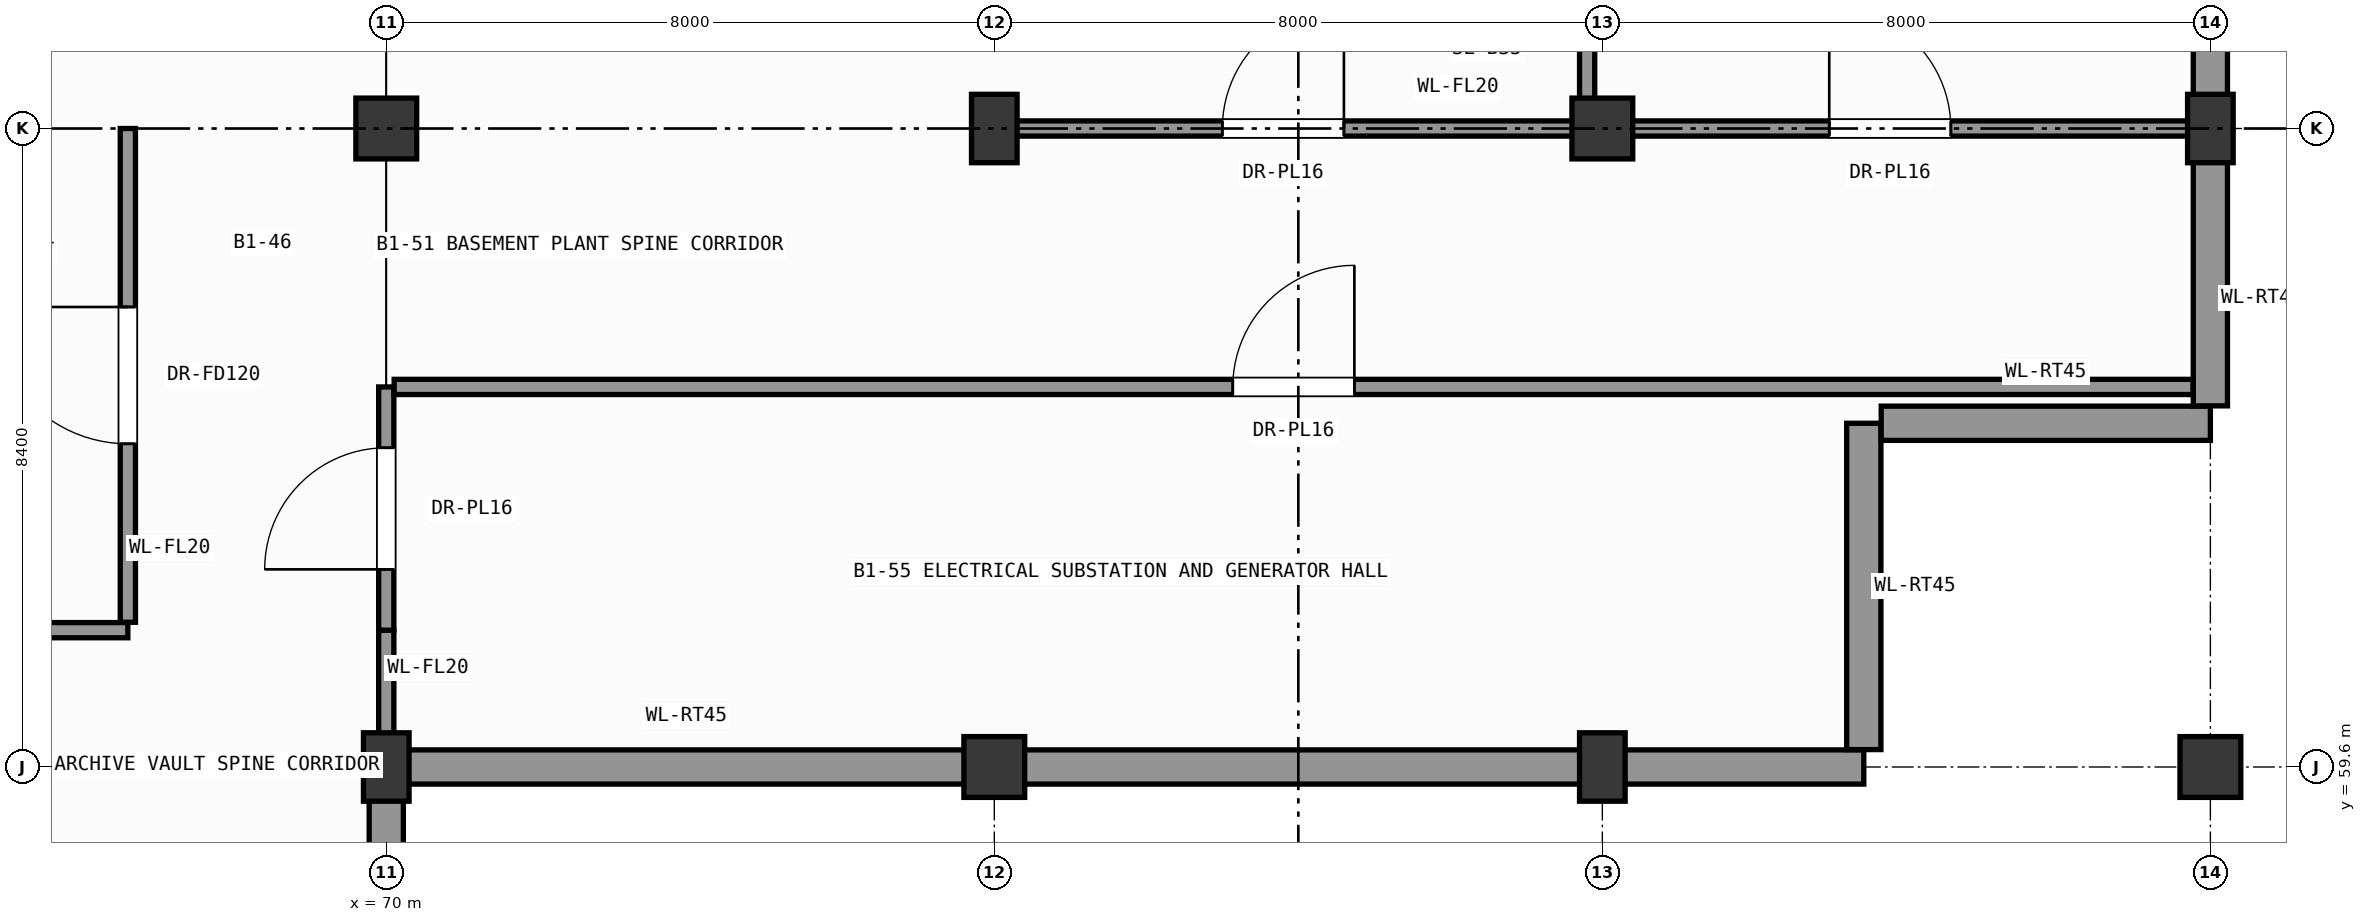
"""IFC4 building model, lengths in metres.
Left out: names, types, materials, properties, quantities, classifications, styles, units other than length and angle.
Written with IfcOpenShell. Run it as: python <this file> out.ifc"""

import sys

from ifc_helpers import new_model, si_unit, direction, frame, frame_2d, origin, origin_2d, place, context, subcontext, project, spatial, rectangle, extrude, element, fill, save


model = new_model("IFC4")
c1 = context("Model", 3, precision=1e-05, world=origin(), true_north=direction((0.0, 1.0)))
c2 = subcontext(c1, "Body", "Model", "MODEL_VIEW")
j1 = project(units=[si_unit("LENGTHUNIT", "METRE"), si_unit("PLANEANGLEUNIT", "RADIAN")], contexts=[c1])
p1 = place(None, origin())
s1 = spatial("IfcSite", under=j1, at=p1, CompositionType="ELEMENT")
p2 = place(p1, origin())
s2 = spatial("IfcBuilding", under=s1, at=p2, CompositionType="ELEMENT")
p3 = place(p2, frame((0.0, 0.0, -4.8)))
s3 = spatial("IfcBuildingStorey", under=s2, at=p3, CompositionType="ELEMENT", Elevation=-4.8)
p4 = place(p3, frame((70.0, 59.6, 0.0), z_axis=(0.0, 0.0, 1.0), x_axis=(1.0, 0.0, 0.0)))
e1 = element("IfcColumn", 1, at=p4, inside=s3, PredefinedType="COLUMN", context=c2, shape_type="SweptSolid", body=[
    extrude(rectangle(XDim=0.6, YDim=0.9, at=origin_2d()), origin(), (0.0, 0.0, 1.0), 4.8),
])
for number, where, z_axis, x_axis in (
    (2, (70.0, 68.0, 0.0), (0.0, 0.0, 1.0), (1.0, 0.0, 0.0)),
    (3, (78.0, 59.6, 0.0), (0.0, 0.0, 1.0), (1.0, 0.0, 0.0)),
):
    element("IfcColumn", number, at=place(p3, frame(where, z_axis=z_axis, x_axis=x_axis)), inside=s3, PredefinedType="COLUMN", context=c2, shape_type="SweptSolid", body=[
        extrude(rectangle(XDim=0.8, YDim=0.8, at=origin_2d()), origin(), (0.0, 0.0, 1.0), 4.8),
    ])
for number, where, z_axis, x_axis in (
    (4, (78.0, 68.0, 0.0), (0.0, 0.0, 1.0), (1.0, 0.0, 0.0)),
    (5, (86.0, 59.6, 0.0), (0.0, 0.0, 1.0), (1.0, 0.0, 0.0)),
):
    element("IfcColumn", number, at=place(p3, frame(where, z_axis=z_axis, x_axis=x_axis)), inside=s3, PredefinedType="COLUMN", context=c2, shape_type="SweptSolid", body=[
        extrude(rectangle(XDim=0.6, YDim=0.9, at=origin_2d()), origin(), (0.0, 0.0, 1.0), 4.8),
    ])
for number, where, z_axis, x_axis in (
    (6, (86.0, 68.0, 0.0), (0.0, 0.0, 1.0), (1.0, 0.0, 0.0)),
    (7, (94.0, 59.6, 0.0), (0.0, 0.0, 1.0), (1.0, 0.0, 0.0)),
):
    element("IfcColumn", number, at=place(p3, frame(where, z_axis=z_axis, x_axis=x_axis)), inside=s3, PredefinedType="COLUMN", context=c2, shape_type="SweptSolid", body=[
        extrude(rectangle(XDim=0.8, YDim=0.8, at=origin_2d()), origin(), (0.0, 0.0, 1.0), 4.8),
    ])
p5 = place(p3, frame((94.0, 68.0, 0.0), z_axis=(0.0, 0.0, 1.0), x_axis=(1.0, 0.0, 0.0)))
e8 = element("IfcColumn", 8, at=p5, inside=s3, PredefinedType="COLUMN", context=c2, shape_type="SweptSolid", body=[
    extrude(rectangle(XDim=0.6, YDim=0.9, at=origin_2d()), origin(), (0.0, 0.0, 1.0), 4.8),
])
p6 = place(p3, frame((70.0, 59.6, 0.0), z_axis=(0.0, 0.0, 1.0), x_axis=(0.0, -1.0, 0.0)))
e9 = element("IfcWall", 9, at=p6, inside=s3, PredefinedType="USERDEFINED", context=c2, shape_type="SweptSolid", body=[
    extrude(rectangle(XDim=6.771, YDim=0.45, at=frame_2d((3.385, 0.0))), origin(), (0.0, 0.0, 1.0), 4.5),
])
p7 = place(p3, frame((78.0, 59.6, 0.0), z_axis=(0.0, 0.0, 1.0), x_axis=(-1.0, 0.0, 0.0)))
e10 = element("IfcWall", 10, at=p7, inside=s3, PredefinedType="USERDEFINED", context=c2, shape_type="SweptSolid", body=[
    extrude(rectangle(XDim=7.771, YDim=0.45, at=frame_2d((3.885, 0.0))), origin(), (0.0, 0.0, 1.0), 4.5),
])
p8 = place(p3, frame((86.0, 59.6, 0.0), z_axis=(0.0, 0.0, 1.0), x_axis=(-1.0, 0.0, 0.0)))
e11 = element("IfcWall", 11, at=p8, inside=s3, PredefinedType="USERDEFINED", context=c2, shape_type="SweptSolid", body=[
    extrude(rectangle(XDim=8.0, YDim=0.45, at=frame_2d((4.0, 0.0))), origin(), (0.0, 0.0, 1.0), 4.5),
])
p9 = place(p3, frame((89.44, 59.6, 0.0), z_axis=(0.0, 0.0, 1.0), x_axis=(-1.0, 0.0, 0.0)))
e12 = element("IfcWall", 12, at=p9, inside=s3, PredefinedType="USERDEFINED", context=c2, shape_type="SweptSolid", body=[
    extrude(rectangle(XDim=3.44, YDim=0.45, at=frame_2d((1.72, 0.0))), origin(), (0.0, 0.0, 1.0), 4.5),
])
p10 = place(p3, frame((89.44, 64.122, 0.0), z_axis=(0.0, 0.0, 1.0), x_axis=(0.0, -1.0, 0.0)))
e13 = element("IfcWall", 13, at=p10, inside=s3, PredefinedType="USERDEFINED", context=c2, shape_type="SweptSolid", body=[
    extrude(rectangle(XDim=4.293, YDim=0.45, at=frame_2d((2.146, 0.0))), origin(), (0.0, 0.0, 1.0), 4.5),
])
p11 = place(p3, frame((94.0, 64.122, 0.0), z_axis=(0.0, 0.0, 1.0), x_axis=(-1.0, 0.0, 0.0)))
e14 = element("IfcWall", 14, at=p11, inside=s3, PredefinedType="USERDEFINED", context=c2, shape_type="SweptSolid", body=[
    extrude(rectangle(XDim=4.331, YDim=0.45, at=frame_2d((2.166, 0.0))), origin(), (0.0, 0.0, 1.0), 4.5),
])
p12 = place(p3, frame((94.0, 68.0, 0.0), z_axis=(0.0, 0.0, 1.0), x_axis=(0.0, -1.0, 0.0)))
e15 = element("IfcWall", 15, at=p12, inside=s3, PredefinedType="USERDEFINED", context=c2, shape_type="SweptSolid", body=[
    extrude(rectangle(XDim=3.649, YDim=0.45, at=frame_2d((1.824, 0.0))), origin(), (0.0, 0.0, 1.0), 4.5),
])
p13 = place(p3, frame((94.0, 76.4, 0.0), z_axis=(0.0, 0.0, 1.0), x_axis=(0.0, -1.0, 0.0)))
e16 = element("IfcWall", 16, at=p13, inside=s3, PredefinedType="USERDEFINED", context=c2, shape_type="SweptSolid", body=[
    extrude(rectangle(XDim=8.4, YDim=0.45, at=frame_2d((4.2, 0.0))), origin(), (0.0, 0.0, 1.0), 4.5),
])
p14 = place(p3, frame((43.6, 61.4, 0.0), z_axis=(0.0, 0.0, 1.0), x_axis=(1.0, 0.0, 0.0)))
e17 = element("IfcWall", 17, at=p14, inside=s3, PredefinedType="PARTITIONING", context=c2, shape_type="SweptSolid", body=[
    extrude(rectangle(XDim=23.0, YDim=0.2, at=frame_2d((11.5, 0.0))), origin(), (0.0, 0.0, 1.0), 4.5),
])
p15 = place(p14, frame((10.6, 0.0, 0.0)))
e18 = element("IfcOpeningElement", 18, at=p15, cuts=e17, PredefinedType="OPENING", context=c2, shape_type="SweptSolid", body=[
    extrude(rectangle(XDim=1.8, YDim=2.4, at=frame_2d((0.9, 1.2))), frame((0.0, 0.11, 0.0), z_axis=(0.0, -1.0, 0.0), x_axis=(1.0, 0.0, 0.0)), (0.0, 0.0, 1.0), 0.22),
])
p16 = place(p3, frame((70.0, 59.6, 0.0), z_axis=(0.0, 0.0, 1.0), x_axis=(0.0, 1.0, 0.0)))
e19 = element("IfcWall", 19, at=p16, inside=s3, PredefinedType="PARTITIONING", context=c2, shape_type="SweptSolid", body=[
    extrude(rectangle(XDim=1.8, YDim=0.2, at=frame_2d((0.9, 0.0))), origin(), (0.0, 0.0, 1.0), 4.045),
])
p17 = place(p3, frame((66.6, 61.504, 0.0), z_axis=(0.0, 0.0, 1.0), x_axis=(0.0, 1.0, 0.0)))
e20 = element("IfcWall", 20, at=p17, inside=s3, PredefinedType="PARTITIONING", context=c2, shape_type="SweptSolid", body=[
    extrude(rectangle(XDim=6.496, YDim=0.2, at=frame_2d((3.248, 0.0))), origin(), (0.0, 0.0, 1.0), 4.5),
])
p18 = place(p17, frame((2.348, 0.0, 0.0)))
e21 = element("IfcOpeningElement", 21, at=p18, cuts=e20, PredefinedType="OPENING", context=c2, shape_type="SweptSolid", body=[
    extrude(rectangle(XDim=1.8, YDim=2.4, at=frame_2d((0.9, 1.2))), frame((0.0, 0.11, 0.0), z_axis=(0.0, -1.0, 0.0), x_axis=(1.0, 0.0, 0.0)), (0.0, 0.0, 1.0), 0.22),
])
p19 = place(p3, frame((70.0, 61.4, 0.0), z_axis=(0.0, 0.0, 1.0), x_axis=(0.0, 1.0, 0.0)))
e22 = element("IfcWall", 22, at=p19, inside=s3, PredefinedType="PARTITIONING", context=c2, shape_type="SweptSolid", body=[
    extrude(rectangle(XDim=3.2, YDim=0.2, at=frame_2d((1.6, 0.0))), origin(), (0.0, 0.0, 1.0), 4.045),
])
p20 = place(p19, frame((0.8, 0.0, 0.0)))
e23 = element("IfcOpeningElement", 23, at=p20, cuts=e22, PredefinedType="OPENING", context=c2, shape_type="SweptSolid", body=[
    extrude(rectangle(XDim=1.6, YDim=2.3, at=frame_2d((0.8, 1.15))), frame((0.0, 0.11, 0.0), z_axis=(0.0, -1.0, 0.0), x_axis=(1.0, 0.0, 0.0)), (0.0, 0.0, 1.0), 0.22),
])
p21 = place(p3, frame((77.8, 68.0, 0.0), z_axis=(0.0, 0.0, 1.0), x_axis=(1.0, 0.0, 0.0)))
e24 = element("IfcWall", 24, at=p21, inside=s3, PredefinedType="PARTITIONING", context=c2, shape_type="SweptSolid", body=[
    extrude(rectangle(XDim=8.0, YDim=0.2, at=frame_2d((4.0, 0.0))), origin(), (0.0, 0.0, 1.0), 4.165),
])
p22 = place(p21, frame((3.2, 0.0, 0.0)))
e25 = element("IfcOpeningElement", 25, at=p22, cuts=e24, PredefinedType="OPENING", context=c2, shape_type="SweptSolid", body=[
    extrude(rectangle(XDim=1.6, YDim=2.3, at=frame_2d((0.8, 1.15))), frame((0.0, 0.11, 0.0), z_axis=(0.0, -1.0, 0.0), x_axis=(1.0, 0.0, 0.0)), (0.0, 0.0, 1.0), 0.22),
])
p23 = place(p3, frame((85.8, 68.0, 0.0), z_axis=(0.0, 0.0, 1.0), x_axis=(1.0, 0.0, 0.0)))
e26 = element("IfcWall", 26, at=p23, inside=s3, PredefinedType="PARTITIONING", context=c2, shape_type="SweptSolid", body=[
    extrude(rectangle(XDim=7.971, YDim=0.2, at=frame_2d((3.985, 0.0))), origin(), (0.0, 0.0, 1.0), 4.085),
])
p24 = place(p23, frame((3.186, 0.0, 0.0)))
e27 = element("IfcOpeningElement", 27, at=p24, cuts=e26, PredefinedType="OPENING", context=c2, shape_type="SweptSolid", body=[
    extrude(rectangle(XDim=1.6, YDim=2.3, at=frame_2d((0.8, 1.15))), frame((0.0, 0.11, 0.0), z_axis=(0.0, -1.0, 0.0), x_axis=(1.0, 0.0, 0.0)), (0.0, 0.0, 1.0), 0.22),
])
p25 = place(p3, frame((70.104, 64.6, 0.0), z_axis=(0.0, 0.0, 1.0), x_axis=(1.0, 0.0, 0.0)))
e28 = element("IfcWall", 28, at=p25, inside=s3, PredefinedType="PARTITIONING", context=c2, shape_type="SweptSolid", body=[
    extrude(rectangle(XDim=23.667, YDim=0.2, at=frame_2d((11.833, 0.0))), origin(), (0.0, 0.0, 1.0), 4.5),
])
p26 = place(p25, frame((11.033, 0.0, 0.0)))
e29 = element("IfcOpeningElement", 29, at=p26, cuts=e28, PredefinedType="OPENING", context=c2, shape_type="SweptSolid", body=[
    extrude(rectangle(XDim=1.6, YDim=2.3, at=frame_2d((0.8, 1.15))), frame((0.0, 0.11, 0.0), z_axis=(0.0, -1.0, 0.0), x_axis=(1.0, 0.0, 0.0)), (0.0, 0.0, 1.0), 0.22),
])
p27 = place(p3, frame((85.8, 68.104, 0.0), z_axis=(0.0, 0.0, 1.0), x_axis=(0.0, 1.0, 0.0)))
e30 = element("IfcWall", 30, at=p27, inside=s3, PredefinedType="PARTITIONING", context=c2, shape_type="SweptSolid", body=[
    extrude(rectangle(XDim=15.067, YDim=0.2, at=frame_2d((7.533, 0.0))), origin(), (0.0, 0.0, 1.0), 4.045),
])
p28 = place(p18, origin())
e31 = element("IfcDoor", 31, at=p28, inside=s3, OperationType="SINGLE_SWING_RIGHT", PredefinedType="DOOR", context=c2, shape_type="SweptSolid", body=[
    extrude(rectangle(XDim=1.8, YDim=2.4, at=frame_2d((0.9, 1.2))), frame((0.0, 0.025, 0.0), z_axis=(0.0, -1.0, 0.0), x_axis=(1.0, 0.0, 0.0)), (0.0, 0.0, 1.0), 0.05),
])
fill(e21, e31)
p29 = place(p20, origin())
e32 = element("IfcDoor", 32, at=p29, inside=s3, OperationType="SINGLE_SWING_LEFT", PredefinedType="DOOR", context=c2, shape_type="SweptSolid", body=[
    extrude(rectangle(XDim=1.6, YDim=2.3, at=frame_2d((0.8, 1.15))), frame((0.0, 0.025, 0.0), z_axis=(0.0, -1.0, 0.0), x_axis=(1.0, 0.0, 0.0)), (0.0, 0.0, 1.0), 0.05),
])
fill(e23, e32)
p30 = place(p22, origin())
e33 = element("IfcDoor", 33, at=p30, inside=s3, OperationType="SINGLE_SWING_RIGHT", PredefinedType="DOOR", context=c2, shape_type="SweptSolid", body=[
    extrude(rectangle(XDim=1.6, YDim=2.3, at=frame_2d((0.8, 1.15))), frame((0.0, 0.025, 0.0), z_axis=(0.0, -1.0, 0.0), x_axis=(1.0, 0.0, 0.0)), (0.0, 0.0, 1.0), 0.05),
])
fill(e25, e33)
p31 = place(p24, origin())
e34 = element("IfcDoor", 34, at=p31, inside=s3, OperationType="SINGLE_SWING_LEFT", PredefinedType="DOOR", context=c2, shape_type="SweptSolid", body=[
    extrude(rectangle(XDim=1.6, YDim=2.3, at=frame_2d((0.8, 1.15))), frame((0.0, 0.025, 0.0), z_axis=(0.0, -1.0, 0.0), x_axis=(1.0, 0.0, 0.0)), (0.0, 0.0, 1.0), 0.05),
])
fill(e27, e34)
p32 = place(p26, origin())
e35 = element("IfcDoor", 35, at=p32, inside=s3, OperationType="SINGLE_SWING_RIGHT", PredefinedType="DOOR", context=c2, shape_type="SweptSolid", body=[
    extrude(rectangle(XDim=1.6, YDim=2.3, at=frame_2d((0.8, 1.15))), frame((0.0, 0.025, 0.0), z_axis=(0.0, -1.0, 0.0), x_axis=(1.0, 0.0, 0.0)), (0.0, 0.0, 1.0), 0.05),
])
fill(e29, e35)
save(model, sys.argv[1])
